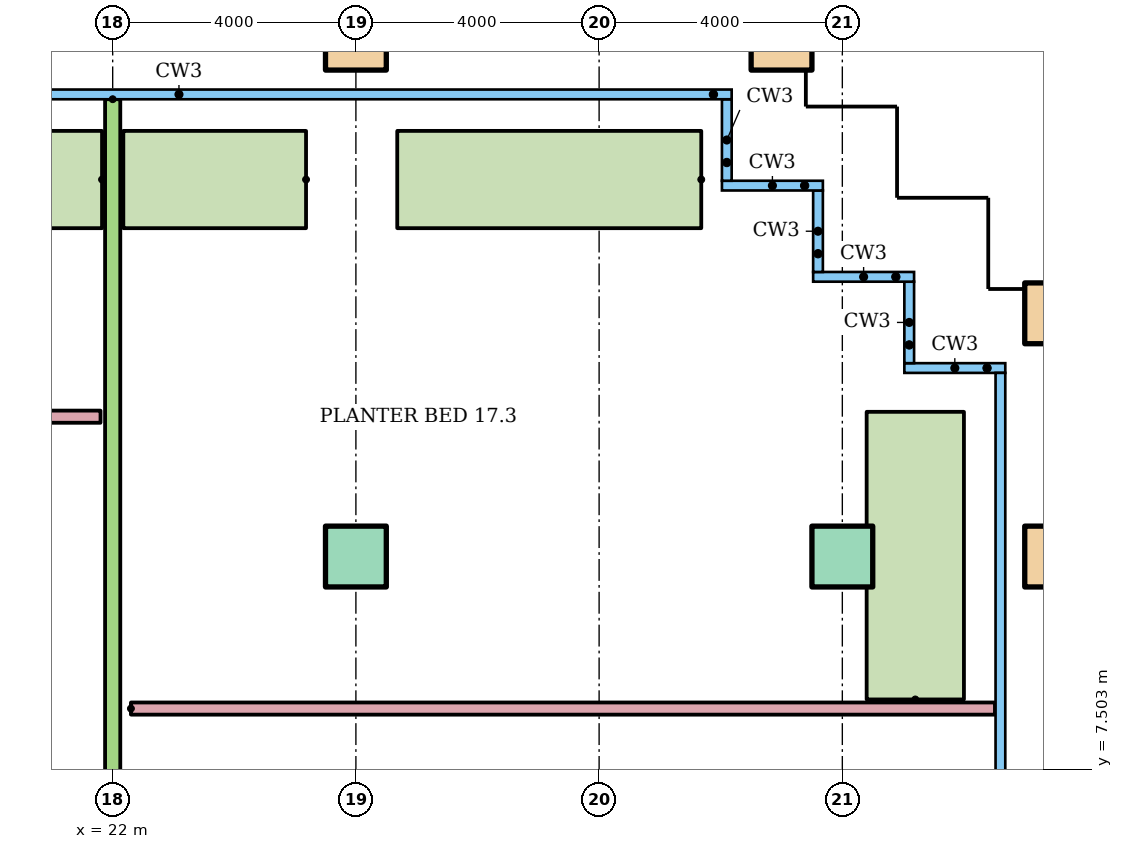
"""IFC4 building model, lengths in metres.
Left out: names, types, materials, properties, quantities, classifications, styles, units other than length and angle.
Written with IfcOpenShell. Run it as: python <this file> out.ifc"""

import sys

from ifc_helpers import new_model, si_unit, direction, frame, frame_2d, origin, origin_2d, place, context, subcontext, project, spatial, rectangle, hollow_rectangle, extrude, element, save


model = new_model("IFC4")
c1 = context("Model", 3, precision=1e-05, world=origin(), true_north=direction((0.0, 1.0)))
c2 = subcontext(c1, "Body", "Model", "MODEL_VIEW")
j1 = project(units=[si_unit("LENGTHUNIT", "METRE"), si_unit("PLANEANGLEUNIT", "RADIAN")], contexts=[c1])
p1 = place(None, origin())
s1 = spatial("IfcSite", under=j1, at=p1, CompositionType="ELEMENT")
p2 = place(p1, origin())
s2 = spatial("IfcBuilding", under=s1, at=p2, CompositionType="ELEMENT")
p3 = place(p2, frame((0.0, 0.0, 64.0)))
s3 = spatial("IfcBuildingStorey", under=s2, at=p3, CompositionType="ELEMENT", Elevation=64.0)
for number, where in (
    (1, (26.0, 11.0, 0.0)),
    (2, (34.0, 11.0, 0.0)),
):
    element("IfcColumn", number, at=place(p3, frame(where)), inside=s3, PredefinedType="COLUMN", context=c2, shape_type="SweptSolid", body=[
        extrude(rectangle(XDim=1.0, YDim=1.0, at=origin_2d()), origin(), (0.0, 0.0, 1.0), 9.6),
    ])
for number, where in (
    (3, (37.5, 11.0, 0.0)),
    (4, (37.5, 15.0, 0.0)),
):
    element("IfcColumn", number, at=place(p3, frame(where)), inside=s3, PredefinedType="COLUMN", context=c2, shape_type="SweptSolid", body=[
        extrude(hollow_rectangle(XDim=1.0, YDim=1.0, WallThickness=0.05, at=origin_2d()), origin(), (0.0, 0.0, 1.0), 8.8),
    ])
p4 = place(p3, frame((26.0, 19.5, 0.0)))
e5 = element("IfcColumn", 5, at=p4, inside=s3, PredefinedType="COLUMN", context=c2, shape_type="SweptSolid", body=[
    extrude(hollow_rectangle(XDim=1.0, YDim=1.0, WallThickness=0.05, at=origin_2d()), origin(), (0.0, 0.0, 1.0), 9.6),
])
p5 = place(p3, frame((33.0, 19.5, 0.0)))
e6 = element("IfcColumn", 6, at=p5, inside=s3, PredefinedType="COLUMN", context=c2, shape_type="SweptSolid", body=[
    extrude(hollow_rectangle(XDim=1.0, YDim=1.0, WallThickness=0.05, at=origin_2d()), origin(), (0.0, 0.0, 1.0), 8.8),
])
p6 = place(p3, frame((31.68, 17.2, 0.0), z_axis=(0.0, 0.0, 1.0), x_axis=(-1.0, 0.0, 0.0)))
e7 = element("IfcWall", 7, at=p6, inside=s3, PredefinedType="STANDARD", context=c2, shape_type="SweptSolid", body=[
    extrude(rectangle(XDim=5.0, YDim=1.6, at=frame_2d((2.5, 0.0))), origin(), (0.0, 0.0, 1.0), 0.8),
])
p7 = place(p3, frame((22.0, 18.521, 0.0), z_axis=(0.0, 0.0, 1.0), x_axis=(0.0, -1.0, 0.0)))
e8 = element("IfcWall", 8, at=p7, inside=s3, PredefinedType="PARTITIONING", context=c2, shape_type="SweptSolid", body=[
    extrude(rectangle(XDim=17.121, YDim=0.25, at=frame_2d((8.561, 0.0))), origin(), (0.0, 0.0, 1.0), 8.8),
])
p8 = place(p3, frame((14.9, 13.3, 0.0)))
e9 = element("IfcWall", 9, at=p8, inside=s3, PredefinedType="PARTITIONING", context=c2, shape_type="SweptSolid", body=[
    extrude(rectangle(XDim=6.9, YDim=0.2, at=frame_2d((3.45, 0.0))), origin(), (0.0, 0.0, 1.0), 0.9),
])
p9 = place(p3, frame((22.3, 8.5, 0.0)))
e10 = element("IfcWall", 10, at=p9, inside=s3, PredefinedType="PARTITIONING", context=c2, shape_type="SweptSolid", body=[
    extrude(rectangle(XDim=14.21, YDim=0.2, at=frame_2d((7.105, 0.0))), origin(), (0.0, 0.0, 1.0), 0.9),
])
p10 = place(p3, frame((25.18, 17.2, 0.0), z_axis=(0.0, 0.0, 1.0), x_axis=(-1.0, 0.0, 0.0)))
e11 = element("IfcWall", 11, at=p10, inside=s3, PredefinedType="STANDARD", context=c2, shape_type="SweptSolid", body=[
    extrude(rectangle(XDim=3.005, YDim=1.6, at=frame_2d((1.502, 0.0))), origin(), (0.0, 0.0, 1.0), 0.8),
])
p11 = place(p3, frame((21.825, 17.2, 0.0), z_axis=(0.0, 0.0, 1.0), x_axis=(-1.0, 0.0, 0.0)))
e12 = element("IfcWall", 12, at=p11, inside=s3, PredefinedType="STANDARD", context=c2, shape_type="SweptSolid", body=[
    extrude(rectangle(XDim=1.645, YDim=1.6, at=frame_2d((0.823, 0.0))), origin(), (0.0, 0.0, 1.0), 0.8),
])
p12 = place(p3, frame((35.2, 8.65, 0.0), z_axis=(0.0, 0.0, 1.0), x_axis=(0.0, 1.0, 0.0)))
e13 = element("IfcWall", 13, at=p12, inside=s3, PredefinedType="STANDARD", context=c2, shape_type="SweptSolid", body=[
    extrude(rectangle(XDim=4.73, YDim=1.6, at=frame_2d((2.365, 0.0))), origin(), (0.0, 0.0, 1.0), 0.8),
])
save(model, sys.argv[1])
